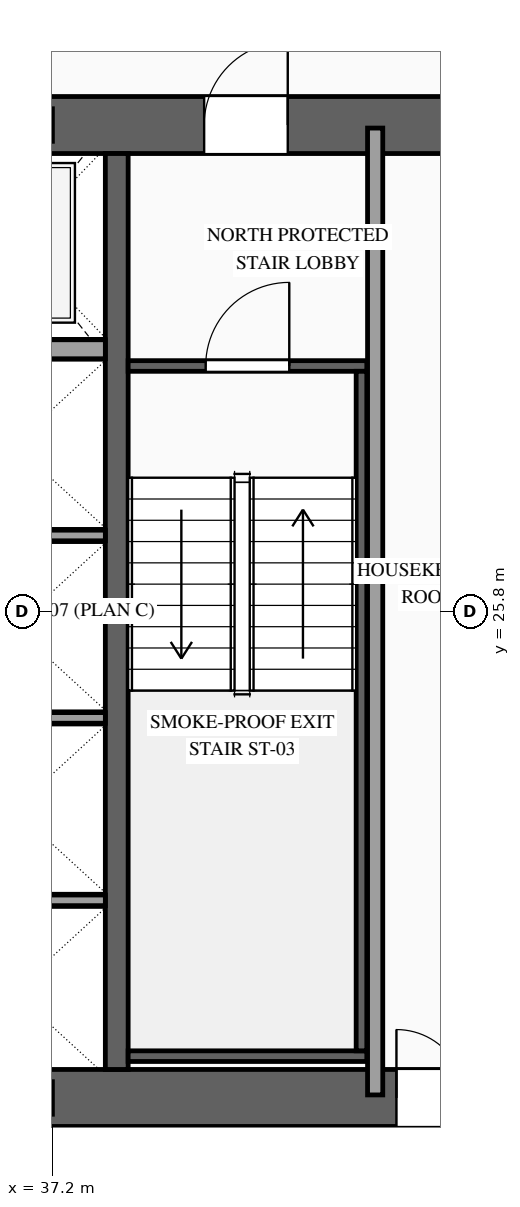
"""IFC4 building model, lengths in metres.
Left out: names, types, materials, properties, quantities, classifications, styles, units other than length and angle.
Written with IfcOpenShell. Run it as: python <this file> out.ifc"""

import sys

from ifc_helpers import new_model, si_unit, direction, frame, frame_2d, origin, origin_2d, place, context, subcontext, project, spatial, rectangle, i_section, extrude, source, transform, mapped, element, fill, save


model = new_model("IFC4")
c1 = context("Model", 3, precision=1e-05, world=origin(), true_north=direction((0.0, 1.0)))
c2 = subcontext(c1, "Body", "Model", "MODEL_VIEW")
j1 = project(units=[si_unit("LENGTHUNIT", "METRE"), si_unit("PLANEANGLEUNIT", "RADIAN")], contexts=[c1])
p1 = place(None, origin())
s1 = spatial("IfcSite", under=j1, at=p1, CompositionType="ELEMENT")
p2 = place(p1, origin())
s2 = spatial("IfcBuilding", under=s1, at=p2, CompositionType="ELEMENT")
p3 = place(p2, frame((0.0, 0.0, 104.6)))
s3 = spatial("IfcBuildingStorey", under=s2, at=p3, CompositionType="ELEMENT", Elevation=104.6)
p4 = place(p3, frame((23.425, 19.4, 0.0), z_axis=(0.0, 0.0, 1.0), x_axis=(1.0, 0.0, 0.0)))
e1 = element("IfcWall", 1, at=p4, inside=s3, PredefinedType="SHEAR", context=c2, shape_type="SweptSolid", body=[
    extrude(rectangle(XDim=27.15, YDim=0.75, at=frame_2d((13.575, 0.0))), origin(), (0.0, 0.0, 1.0), 3.6),
])
p5 = place(p4, frame((2.025, 0.0, 0.0)))
e2 = element("IfcOpeningElement", 2, at=p5, cuts=e1, PredefinedType="OPENING", context=c2, shape_type="SweptSolid", body=[
    extrude(rectangle(XDim=1.1, YDim=2.2, at=frame_2d((0.55, 1.1))), frame((0.0, 0.39, 0.0), z_axis=(0.0, -1.0, 0.0), x_axis=(1.0, 0.0, 0.0)), (0.0, 0.0, 1.0), 0.78),
])
p6 = place(p4, frame((9.925, 0.0, 0.0)))
e3 = element("IfcOpeningElement", 3, at=p6, cuts=e1, PredefinedType="OPENING", context=c2, shape_type="SweptSolid", body=[
    extrude(rectangle(XDim=1.1, YDim=2.2, at=frame_2d((0.55, 1.1))), frame((0.0, 0.39, 0.0), z_axis=(0.0, -1.0, 0.0), x_axis=(1.0, 0.0, 0.0)), (0.0, 0.0, 1.0), 0.78),
])
p7 = place(p4, frame((23.125, 0.0, 0.0)))
e4 = element("IfcOpeningElement", 4, at=p7, cuts=e1, PredefinedType="OPENING", context=c2, shape_type="SweptSolid", body=[
    extrude(rectangle(XDim=1.1, YDim=2.2, at=frame_2d((0.55, 1.1))), frame((0.0, 0.39, 0.0), z_axis=(0.0, -1.0, 0.0), x_axis=(1.0, 0.0, 0.0)), (0.0, 0.0, 1.0), 0.78),
])
p8 = place(p4, frame((19.745, 0.0, 0.0)))
e5 = element("IfcOpeningElement", 5, at=p8, cuts=e1, PredefinedType="OPENING", context=c2, shape_type="SweptSolid", body=[
    extrude(rectangle(XDim=0.9, YDim=2.15, at=frame_2d((0.45, 1.075))), frame((0.0, 0.39, 0.0), z_axis=(0.0, -1.0, 0.0), x_axis=(1.0, 0.0, 0.0)), (0.0, 0.0, 1.0), 0.78),
])
p9 = place(p4, frame((18.305, 0.0, 0.0)))
e6 = element("IfcOpeningElement", 6, at=p9, cuts=e1, PredefinedType="OPENING", context=c2, shape_type="SweptSolid", body=[
    extrude(rectangle(XDim=0.9, YDim=2.15, at=frame_2d((0.45, 1.075))), frame((0.0, 0.39, 0.0), z_axis=(0.0, -1.0, 0.0), x_axis=(1.0, 0.0, 0.0)), (0.0, 0.0, 1.0), 0.78),
])
p10 = place(p3, frame((23.425, 32.2, 0.0), z_axis=(0.0, 0.0, 1.0), x_axis=(1.0, 0.0, 0.0)))
e7 = element("IfcWall", 7, at=p10, inside=s3, PredefinedType="SHEAR", context=c2, shape_type="SweptSolid", body=[
    extrude(rectangle(XDim=27.15, YDim=0.75, at=frame_2d((13.575, 0.0))), origin(), (0.0, 0.0, 1.0), 3.6),
])
p11 = place(p10, frame((4.645, 0.0, 0.0)))
e8 = element("IfcOpeningElement", 8, at=p11, cuts=e7, PredefinedType="OPENING", context=c2, shape_type="SweptSolid", body=[
    extrude(rectangle(XDim=0.9, YDim=2.15, at=frame_2d((0.45, 1.075))), frame((0.0, 0.39, 0.0), z_axis=(0.0, -1.0, 0.0), x_axis=(1.0, 0.0, 0.0)), (0.0, 0.0, 1.0), 0.78),
])
p12 = place(p10, frame((9.925, 0.0, 0.0)))
e9 = element("IfcOpeningElement", 9, at=p12, cuts=e7, PredefinedType="OPENING", context=c2, shape_type="SweptSolid", body=[
    extrude(rectangle(XDim=1.1, YDim=2.2, at=frame_2d((0.55, 1.1))), frame((0.0, 0.39, 0.0), z_axis=(0.0, -1.0, 0.0), x_axis=(1.0, 0.0, 0.0)), (0.0, 0.0, 1.0), 0.78),
])
p13 = place(p10, frame((15.775, 0.0, 0.0)))
e10 = element("IfcOpeningElement", 10, at=p13, cuts=e7, PredefinedType="OPENING", context=c2, shape_type="SweptSolid", body=[
    extrude(rectangle(XDim=1.1, YDim=2.2, at=frame_2d((0.55, 1.1))), frame((0.0, 0.39, 0.0), z_axis=(0.0, -1.0, 0.0), x_axis=(1.0, 0.0, 0.0)), (0.0, 0.0, 1.0), 0.78),
])
p14 = place(p10, frame((19.745, 0.0, 0.0)))
e11 = element("IfcOpeningElement", 11, at=p14, cuts=e7, PredefinedType="OPENING", context=c2, shape_type="SweptSolid", body=[
    extrude(rectangle(XDim=0.9, YDim=2.15, at=frame_2d((0.45, 1.075))), frame((0.0, 0.39, 0.0), z_axis=(0.0, -1.0, 0.0), x_axis=(1.0, 0.0, 0.0)), (0.0, 0.0, 1.0), 0.78),
])
m1 = source(origin(), c2, "Body", "SweptSolid", [
    extrude(rectangle(XDim=12.05, YDim=0.3, at=frame_2d((6.025, 0.0))), origin(), (0.0, 0.0, 1.0), 3.6),
])
p15 = place(p3, frame((38.05, 19.775, 0.0), z_axis=(0.0, 0.0, 1.0), x_axis=(0.0, 1.0, 0.0)))
e12 = element("IfcWall", 12, at=p15, inside=s3, PredefinedType="SOLIDWALL", context=c2, shape_type="MappedRepresentation", body=[
    mapped(m1, transform((0.0, 0.0, 0.0), scale=1.0)),
])
m2 = source(origin(), c2, "Body", "SweptSolid", [
    extrude(i_section(OverallWidth=0.407, OverallDepth=0.428, WebThickness=0.02, FlangeThickness=0.035, at=origin_2d()), origin(), (0.0, 0.0, 1.0), 3.6),
])
for number, where, z_axis, x_axis in (
    (13, (37.0, 19.4, 0.0), (0.0, 0.0, 1.0), (1.0, 0.0, 0.0)),
    (14, (37.0, 32.2, 0.0), (0.0, 0.0, 1.0), (1.0, 0.0, 0.0)),
):
    element("IfcColumn", number, at=place(p3, frame(where, z_axis=z_axis, x_axis=x_axis)), inside=s3, PredefinedType="COLUMN", context=c2, shape_type="MappedRepresentation", body=[
        mapped(m2, transform((0.0, 0.0, 0.0), scale=1.0)),
    ])
m3 = source(origin(), c2, "Body", "SweptSolid", [
    extrude(rectangle(XDim=2.4, YDim=0.14, at=frame_2d((1.2, 0.0))), origin(), (0.0, 0.0, 1.0), 3.38),
])
for number, where, z_axis, x_axis in (
    (15, (35.5, 22.0, 0.0), (0.0, 0.0, 1.0), (1.0, 0.0, 0.0)),
    (16, (35.5, 24.4, 0.0), (0.0, 0.0, 1.0), (1.0, 0.0, 0.0)),
    (17, (35.5, 26.8, 0.0), (0.0, 0.0, 1.0), (1.0, 0.0, 0.0)),
):
    element("IfcWall", number, at=place(p3, frame(where, z_axis=z_axis, x_axis=x_axis)), inside=s3, PredefinedType="SOLIDWALL", context=c2, shape_type="MappedRepresentation", body=[
        mapped(m3, transform((0.0, 0.0, 0.0), scale=1.0)),
    ])
m4 = source(origin(), c2, "Body", "SweptSolid", [
    extrude(rectangle(XDim=2.4, YDim=0.25, at=frame_2d((1.2, 0.0))), origin(), (0.0, 0.0, 1.0), 3.38),
])
p16 = place(p3, frame((35.5, 29.25, 0.0), z_axis=(0.0, 0.0, 1.0), x_axis=(1.0, 0.0, 0.0)))
e18 = element("IfcWall", 18, at=p16, inside=s3, PredefinedType="SOLIDWALL", context=c2, shape_type="MappedRepresentation", body=[
    mapped(m4, transform((0.0, 0.0, 0.0), scale=1.0)),
])
p17 = place(p3, frame((38.2, 29.03, 0.0), z_axis=(0.0, 0.0, 1.0), x_axis=(1.0, 0.0, 0.0)))
e19 = element("IfcWall", 19, at=p17, inside=s3, PredefinedType="SOLIDWALL", context=c2, shape_type="SweptSolid", body=[
    extrude(rectangle(XDim=3.14, YDim=0.14, at=frame_2d((1.57, 0.0))), origin(), (0.0, 0.0, 1.0), 3.38),
])
p18 = place(p17, frame((1.02, 0.0, 0.0)))
e20 = element("IfcOpeningElement", 20, at=p18, cuts=e19, PredefinedType="OPENING", context=c2, shape_type="SweptSolid", body=[
    extrude(rectangle(XDim=1.1, YDim=2.2, at=frame_2d((0.55, 1.1))), frame((0.0, 0.085, 0.0), z_axis=(0.0, -1.0, 0.0), x_axis=(1.0, 0.0, 0.0)), (0.0, 0.0, 1.0), 0.17),
])
m5 = source(origin(), c2, "Body", "SweptSolid", [
    extrude(rectangle(XDim=3.14, YDim=0.14, at=frame_2d((1.57, 0.0))), origin(), (0.0, 0.0, 1.0), 3.38),
])
p19 = place(p3, frame((38.2, 19.95, 0.0), z_axis=(0.0, 0.0, 1.0), x_axis=(1.0, 0.0, 0.0)))
e21 = element("IfcWall", 21, at=p19, inside=s3, PredefinedType="SOLIDWALL", context=c2, shape_type="MappedRepresentation", body=[
    mapped(m5, transform((0.0, 0.0, 0.0), scale=1.0)),
])
m6 = source(origin(), c2, "Body", "SweptSolid", [
    extrude(rectangle(XDim=8.94, YDim=0.14, at=frame_2d((4.47, 0.0))), origin(), (0.0, 0.0, 1.0), 3.38),
])
p20 = place(p3, frame((41.27, 20.02, 0.0), z_axis=(0.0, 0.0, 1.0), x_axis=(0.0, 1.0, 0.0)))
e22 = element("IfcWall", 22, at=p20, inside=s3, PredefinedType="SOLIDWALL", context=c2, shape_type="MappedRepresentation", body=[
    mapped(m6, transform((0.0, 0.0, 0.0), scale=1.0)),
])
m7 = source(origin(), c2, "Body", "SweptSolid", [
    extrude(rectangle(XDim=12.72, YDim=0.2, at=frame_2d((6.36, 0.0))), origin(), (0.0, 0.0, 1.0), 3.38),
])
p21 = place(p3, frame((41.45, 19.44, 0.0), z_axis=(0.0, 0.0, 1.0), x_axis=(0.0, 1.0, 0.0)))
e23 = element("IfcWall", 23, at=p21, inside=s3, PredefinedType="PARTITIONING", context=c2, shape_type="MappedRepresentation", body=[
    mapped(m7, transform((0.0, 0.0, 0.0), scale=1.0)),
])
m8 = source(origin(), c2, "Body", "SweptSolid", [
    extrude(rectangle(XDim=1.1, YDim=2.2, at=frame_2d((0.55, 1.1))), frame((0.0, 0.025, 0.0), z_axis=(0.0, -1.0, 0.0), x_axis=(1.0, 0.0, 0.0)), (0.0, 0.0, 1.0), 0.05),
])
p22 = place(p18, origin())
e24 = element("IfcDoor", 24, at=p22, inside=s3, OperationType="SINGLE_SWING_RIGHT", PredefinedType="DOOR", context=c2, shape_type="MappedRepresentation", body=[
    mapped(m8, transform((0.0, 0.0, 0.0), scale=1.0)),
])
fill(e20, e24)
p23 = place(p13, origin())
e25 = element("IfcDoor", 25, at=p23, inside=s3, OperationType="SINGLE_SWING_RIGHT", PredefinedType="DOOR", context=c2, shape_type="MappedRepresentation", body=[
    mapped(m8, transform((0.0, 0.0, 0.0), scale=1.0)),
])
fill(e10, e25)
m9 = source(origin(), c2, "Body", "SweptSolid", [
    extrude(rectangle(XDim=0.9, YDim=2.15, at=frame_2d((0.45, 1.075))), frame((0.0, 0.025, 0.0), z_axis=(0.0, -1.0, 0.0), x_axis=(1.0, 0.0, 0.0)), (0.0, 0.0, 1.0), 0.05),
])
p24 = place(p9, origin())
e26 = element("IfcDoor", 26, at=p24, inside=s3, OperationType="SINGLE_SWING_LEFT", PredefinedType="DOOR", context=c2, shape_type="MappedRepresentation", body=[
    mapped(m9, transform((0.0, 0.0, 0.0), scale=1.0)),
])
fill(e6, e26)
save(model, sys.argv[1])
